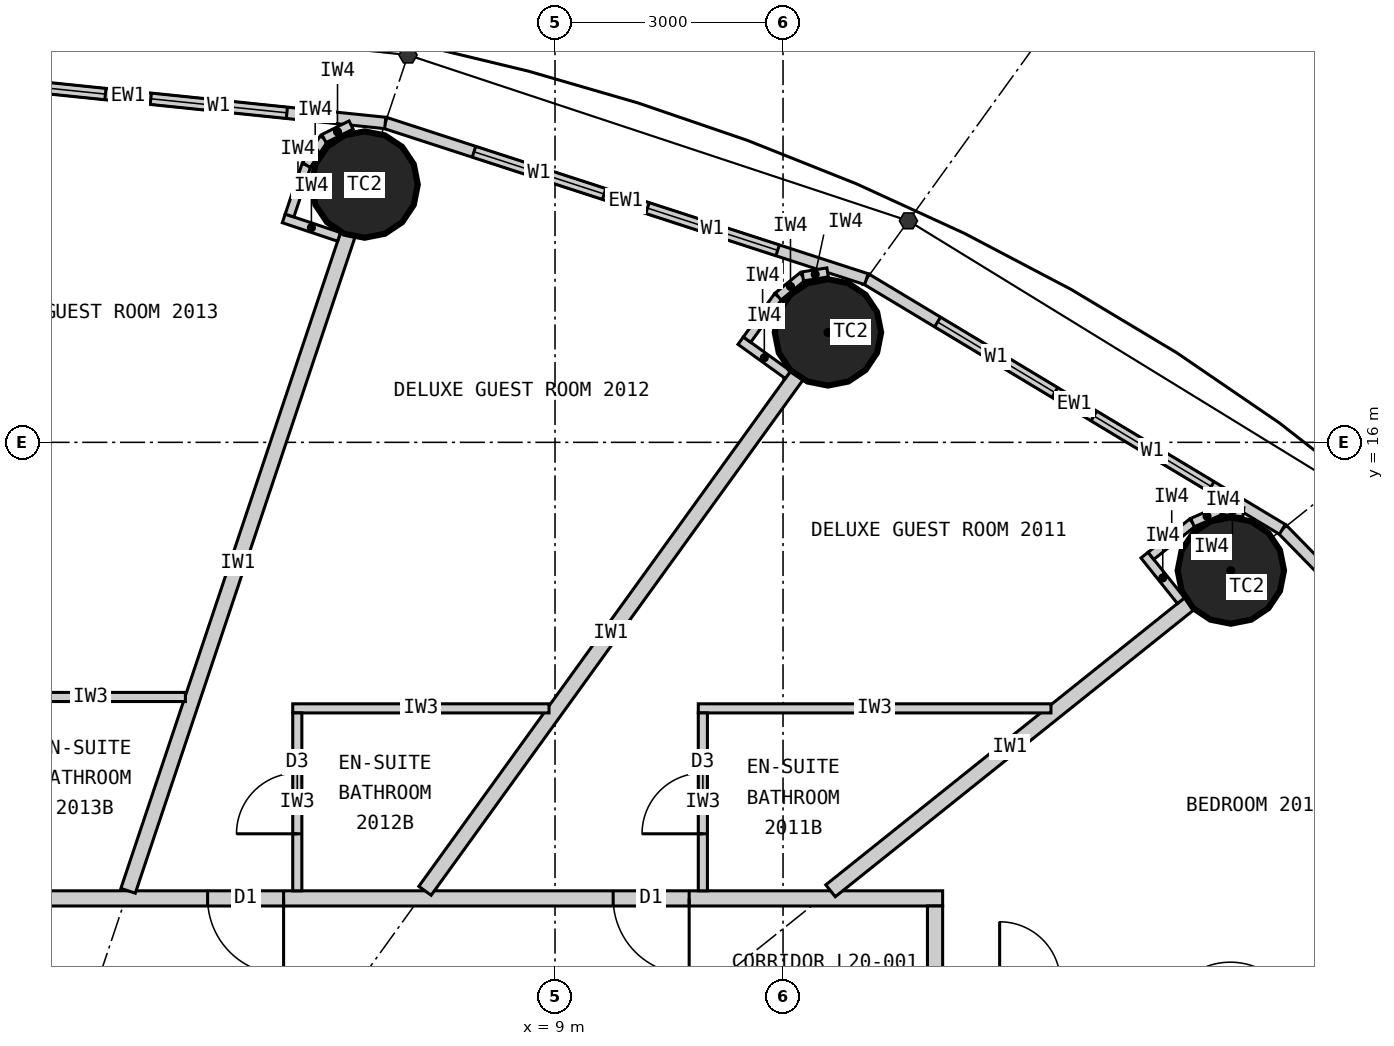
"""IFC4 building model, lengths in metres.
Left out: names, types, materials, properties, quantities, classifications, styles, units other than length and angle.
Written with IfcOpenShell. Run it as: python <this file> out.ifc"""

import sys

from ifc_helpers import new_model, si_unit, direction, frame, frame_2d, origin, origin_2d, place, context, subcontext, project, spatial, rectangle, circle, extrude, element, fill, save


model = new_model("IFC4")
c1 = context("Model", 3, precision=1e-05, world=origin(), true_north=direction((0.0, 1.0)))
c2 = subcontext(c1, "Body", "Model", "MODEL_VIEW")
j1 = project(units=[si_unit("LENGTHUNIT", "METRE"), si_unit("PLANEANGLEUNIT", "RADIAN")], contexts=[c1])
p1 = place(None, origin())
s1 = spatial("IfcSite", under=j1, at=p1, CompositionType="ELEMENT")
p2 = place(p1, origin())
s2 = spatial("IfcBuilding", under=s1, at=p2, CompositionType="ELEMENT")
p3 = place(p2, frame((0.0, 0.0, 80.4)))
s3 = spatial("IfcBuildingStorey", under=s2, at=p3, CompositionType="ELEMENT", Elevation=80.4)
for number, where, z_axis, x_axis in (
    (1, (17.892, 14.313, 0.0), (0.0, 0.0, 1.0), (1.0, 0.0, 0.0)),
    (2, (12.591, 17.447, 0.0), (0.0, 0.0, 1.0), (1.0, 0.0, 0.0)),
    (3, (6.495, 19.391, 0.0), (0.0, 0.0, 1.0), (1.0, 0.0, 0.0)),
):
    element("IfcColumn", number, at=place(p3, frame(where, z_axis=z_axis, x_axis=x_axis)), inside=s3, PredefinedType="COLUMN", context=c2, shape_type="SweptSolid", body=[
        extrude(circle(Radius=0.7, at=origin_2d()), origin(), (0.0, 0.0, 1.0), 3.3),
    ])
p4 = place(p3, frame((22.803, 10.532, 0.0), z_axis=(0.0, 0.0, 1.0), x_axis=(-0.699602905915, 0.714531856557, 0.0)))
e4 = element("IfcWall", 4, at=p4, inside=s3, PredefinedType="ELEMENTEDWALL", context=c2, shape_type="SweptSolid", body=[
    extrude(rectangle(XDim=6.051, YDim=0.15, at=frame_2d((3.025, 0.0))), origin(), (0.0, 0.0, 1.0), 3.12),
])
p5 = place(p4, frame((0.926, 0.0, 0.9)))
e5 = element("IfcOpeningElement", 5, at=p5, cuts=e4, PredefinedType="OPENING", context=c2, shape_type="SweptSolid", body=[
    extrude(rectangle(XDim=1.8, YDim=1.9, at=frame_2d((0.9, 0.95))), frame((0.0, 0.085, 0.0), z_axis=(0.0, -1.0, 0.0), x_axis=(1.0, 0.0, 0.0)), (0.0, 0.0, 1.0), 0.17),
])
p6 = place(p4, frame((3.325, 0.0, 0.9)))
e6 = element("IfcOpeningElement", 6, at=p6, cuts=e4, PredefinedType="OPENING", context=c2, shape_type="SweptSolid", body=[
    extrude(rectangle(XDim=1.8, YDim=1.9, at=frame_2d((0.9, 0.95))), frame((0.0, 0.085, 0.0), z_axis=(0.0, -1.0, 0.0), x_axis=(1.0, 0.0, 0.0)), (0.0, 0.0, 1.0), 0.17),
])
p7 = place(p3, frame((18.57, 14.856, 0.0), z_axis=(0.0, 0.0, 1.0), x_axis=(-0.856983180864, 0.515344377787, 0.0)))
e7 = element("IfcWall", 7, at=p7, inside=s3, PredefinedType="ELEMENTEDWALL", context=c2, shape_type="SweptSolid", body=[
    extrude(rectangle(XDim=6.386, YDim=0.15, at=frame_2d((3.193, 0.0))), origin(), (0.0, 0.0, 1.0), 3.12),
])
p8 = place(p7, frame((1.093, 0.0, 0.9)))
e8 = element("IfcOpeningElement", 8, at=p8, cuts=e7, PredefinedType="OPENING", context=c2, shape_type="SweptSolid", body=[
    extrude(rectangle(XDim=1.8, YDim=1.9, at=frame_2d((0.9, 0.95))), frame((0.0, 0.085, 0.0), z_axis=(0.0, -1.0, 0.0), x_axis=(1.0, 0.0, 0.0)), (0.0, 0.0, 1.0), 0.17),
])
p9 = place(p7, frame((3.493, 0.0, 0.9)))
e9 = element("IfcOpeningElement", 9, at=p9, cuts=e7, PredefinedType="OPENING", context=c2, shape_type="SweptSolid", body=[
    extrude(rectangle(XDim=1.8, YDim=1.9, at=frame_2d((0.9, 0.95))), frame((0.0, 0.085, 0.0), z_axis=(0.0, -1.0, 0.0), x_axis=(1.0, 0.0, 0.0)), (0.0, 0.0, 1.0), 0.17),
])
p10 = place(p3, frame((13.096, 18.147, 0.0), z_axis=(0.0, 0.0, 1.0), x_axis=(-0.951137534625, 0.308767534285, 0.0)))
e10 = element("IfcWall", 10, at=p10, inside=s3, PredefinedType="ELEMENTEDWALL", context=c2, shape_type="SweptSolid", body=[
    extrude(rectangle(XDim=6.655, YDim=0.15, at=frame_2d((3.328, 0.0))), origin(), (0.0, 0.0, 1.0), 3.12),
])
p11 = place(p10, frame((1.228, 0.0, 0.9)))
e11 = element("IfcOpeningElement", 11, at=p11, cuts=e10, PredefinedType="OPENING", context=c2, shape_type="SweptSolid", body=[
    extrude(rectangle(XDim=1.8, YDim=1.9, at=frame_2d((0.9, 0.95))), frame((0.0, 0.085, 0.0), z_axis=(0.0, -1.0, 0.0), x_axis=(1.0, 0.0, 0.0)), (0.0, 0.0, 1.0), 0.17),
])
p12 = place(p10, frame((3.628, 0.0, 0.9)))
e12 = element("IfcOpeningElement", 12, at=p12, cuts=e10, PredefinedType="OPENING", context=c2, shape_type="SweptSolid", body=[
    extrude(rectangle(XDim=1.8, YDim=1.9, at=frame_2d((0.9, 0.95))), frame((0.0, 0.085, 0.0), z_axis=(0.0, -1.0, 0.0), x_axis=(1.0, 0.0, 0.0)), (0.0, 0.0, 1.0), 0.17),
])
p13 = place(p3, frame((6.766, 20.202, 0.0), z_axis=(0.0, 0.0, 1.0), x_axis=(-0.994721394369, 0.102612609291, 0.0)))
e13 = element("IfcWall", 13, at=p13, inside=s3, PredefinedType="ELEMENTEDWALL", context=c2, shape_type="SweptSolid", body=[
    extrude(rectangle(XDim=6.802, YDim=0.15, at=frame_2d((3.401, 0.0))), origin(), (0.0, 0.0, 1.0), 3.12),
])
p14 = place(p13, frame((1.301, 0.0, 0.9)))
e14 = element("IfcOpeningElement", 14, at=p14, cuts=e13, PredefinedType="OPENING", context=c2, shape_type="SweptSolid", body=[
    extrude(rectangle(XDim=1.8, YDim=1.9, at=frame_2d((0.9, 0.95))), frame((0.0, 0.085, 0.0), z_axis=(0.0, -1.0, 0.0), x_axis=(1.0, 0.0, 0.0)), (0.0, 0.0, 1.0), 0.17),
])
p15 = place(p13, frame((3.701, 0.0, 0.9)))
e15 = element("IfcOpeningElement", 15, at=p15, cuts=e13, PredefinedType="OPENING", context=c2, shape_type="SweptSolid", body=[
    extrude(rectangle(XDim=1.8, YDim=1.9, at=frame_2d((0.9, 0.95))), frame((0.0, 0.085, 0.0), z_axis=(0.0, -1.0, 0.0), x_axis=(1.0, 0.0, 0.0)), (0.0, 0.0, 1.0), 0.17),
])
p16 = place(p3, frame((-14.1, 10.0, 0.0), z_axis=(0.0, 0.0, 1.0), x_axis=(1.0, 0.0, 0.0)))
e16 = element("IfcWall", 16, at=p16, inside=s3, PredefinedType="PARTITIONING", context=c2, shape_type="SweptSolid", body=[
    extrude(rectangle(XDim=28.2, YDim=0.2, at=frame_2d((14.1, 0.0))), origin(), (0.0, 0.0, 1.0), 3.12),
])
p17 = place(p16, frame((23.865, 0.0, 0.0)))
e17 = element("IfcOpeningElement", 17, at=p17, cuts=e16, PredefinedType="OPENING", context=c2, shape_type="SweptSolid", body=[
    extrude(rectangle(XDim=1.0, YDim=2.2, at=frame_2d((0.5, 1.1))), frame((0.0, 0.11, 0.0), z_axis=(0.0, -1.0, 0.0), x_axis=(1.0, 0.0, 0.0)), (0.0, 0.0, 1.0), 0.22),
])
p18 = place(p16, frame((18.529, 0.0, 0.0)))
e18 = element("IfcOpeningElement", 18, at=p18, cuts=e16, PredefinedType="OPENING", context=c2, shape_type="SweptSolid", body=[
    extrude(rectangle(XDim=1.0, YDim=2.2, at=frame_2d((0.5, 1.1))), frame((0.0, 0.11, 0.0), z_axis=(0.0, -1.0, 0.0), x_axis=(1.0, 0.0, 0.0)), (0.0, 0.0, 1.0), 0.22),
])
p19 = place(p16, frame((14.623, 0.0, 0.0)))
e19 = element("IfcOpeningElement", 19, at=p19, cuts=e16, PredefinedType="OPENING", context=c2, shape_type="SweptSolid", body=[
    extrude(rectangle(XDim=1.0, YDim=2.2, at=frame_2d((0.5, 1.1))), frame((0.0, 0.11, 0.0), z_axis=(0.0, -1.0, 0.0), x_axis=(1.0, 0.0, 0.0)), (0.0, 0.0, 1.0), 0.22),
])
p20 = place(p16, frame((11.24, 0.0, 0.0)))
e20 = element("IfcOpeningElement", 20, at=p20, cuts=e16, PredefinedType="OPENING", context=c2, shape_type="SweptSolid", body=[
    extrude(rectangle(XDim=1.0, YDim=2.2, at=frame_2d((0.5, 1.1))), frame((0.0, 0.11, 0.0), z_axis=(0.0, -1.0, 0.0), x_axis=(1.0, 0.0, 0.0)), (0.0, 0.0, 1.0), 0.22),
])
p21 = place(p16, frame((8.671, 0.0, 0.0)))
e21 = element("IfcOpeningElement", 21, at=p21, cuts=e16, PredefinedType="OPENING", context=c2, shape_type="SweptSolid", body=[
    extrude(rectangle(XDim=1.0, YDim=2.2, at=frame_2d((0.5, 1.1))), frame((0.0, 0.11, 0.0), z_axis=(0.0, -1.0, 0.0), x_axis=(1.0, 0.0, 0.0)), (0.0, 0.0, 1.0), 0.22),
])
p22 = place(p16, frame((2.801, 0.0, 0.0)))
e22 = element("IfcOpeningElement", 22, at=p22, cuts=e16, PredefinedType="OPENING", context=c2, shape_type="SweptSolid", body=[
    extrude(rectangle(XDim=1.0, YDim=2.2, at=frame_2d((0.5, 1.1))), frame((0.0, 0.11, 0.0), z_axis=(0.0, -1.0, 0.0), x_axis=(1.0, 0.0, 0.0)), (0.0, 0.0, 1.0), 0.22),
])
p23 = place(p3, frame((14.0, -9.9, 0.0), z_axis=(0.0, 0.0, 1.0), x_axis=(0.0, 1.0, 0.0)))
e23 = element("IfcWall", 23, at=p23, inside=s3, PredefinedType="PARTITIONING", context=c2, shape_type="SweptSolid", body=[
    extrude(rectangle(XDim=19.8, YDim=0.2, at=frame_2d((9.9, 0.0))), origin(), (0.0, 0.0, 1.0), 3.12),
])
p24 = place(p23, frame((5.948, 0.0, 0.0)))
e24 = element("IfcOpeningElement", 24, at=p24, cuts=e23, PredefinedType="OPENING", context=c2, shape_type="SweptSolid", body=[
    extrude(rectangle(XDim=1.0, YDim=2.2, at=frame_2d((0.5, 1.1))), frame((0.0, 0.11, 0.0), z_axis=(0.0, -1.0, 0.0), x_axis=(1.0, 0.0, 0.0)), (0.0, 0.0, 1.0), 0.22),
])
p25 = place(p23, frame((11.46, 0.0, 0.0)))
e25 = element("IfcOpeningElement", 25, at=p25, cuts=e23, PredefinedType="OPENING", context=c2, shape_type="SweptSolid", body=[
    extrude(rectangle(XDim=1.0, YDim=2.2, at=frame_2d((0.5, 1.1))), frame((0.0, 0.11, 0.0), z_axis=(0.0, -1.0, 0.0), x_axis=(1.0, 0.0, 0.0)), (0.0, 0.0, 1.0), 0.22),
])
p26 = place(p3, frame((14.1, 6.512, 0.0), z_axis=(0.0, 0.0, 1.0), x_axis=(0.907832871056, 0.419332181247, 0.0)))
e26 = element("IfcWall", 26, at=p26, inside=s3, PredefinedType="PARTITIONING", context=c2, shape_type="SweptSolid", body=[
    extrude(rectangle(XDim=8.023, YDim=0.2, at=frame_2d((4.011, 0.0))), origin(), (0.0, 0.0, 1.0), 2.32),
])
p27 = place(p26, frame((4.17, 0.0, 0.0)))
e27 = element("IfcOpeningElement", 27, at=p27, cuts=e26, PredefinedType="OPENING", context=c2, shape_type="SweptSolid", body=[
    extrude(rectangle(XDim=0.9, YDim=2.1, at=frame_2d((0.45, 1.05))), frame((0.0, 0.11, 0.0), z_axis=(0.0, -1.0, 0.0), x_axis=(1.0, 0.0, 0.0)), (0.0, 0.0, 1.0), 0.22),
])
p28 = place(p3, frame((12.625, 10.1, 0.0), z_axis=(0.0, 0.0, 1.0), x_axis=(0.780892451574, 0.624665493744, 0.0)))
e28 = element("IfcWall", 28, at=p28, inside=s3, PredefinedType="PARTITIONING", context=c2, shape_type="SweptSolid", body=[
    extrude(rectangle(XDim=6.045, YDim=0.2, at=frame_2d((3.022, 0.0))), origin(), (0.0, 0.0, 1.0), 2.32),
])
p29 = place(p3, frame((7.289, 10.1, 0.0), z_axis=(0.0, 0.0, 1.0), x_axis=(0.585198353053, 0.810890182197, 0.0)))
e29 = element("IfcWall", 29, at=p29, inside=s3, PredefinedType="PARTITIONING", context=c2, shape_type="SweptSolid", body=[
    extrude(rectangle(XDim=8.36, YDim=0.2, at=frame_2d((4.18, 0.0))), origin(), (0.0, 0.0, 1.0), 2.32),
])
p30 = place(p3, frame((3.383, 10.1, 0.0), z_axis=(0.0, 0.0, 1.0), x_axis=(0.31759592231, 0.948226149256, 0.0)))
e30 = element("IfcWall", 30, at=p30, inside=s3, PredefinedType="PARTITIONING", context=c2, shape_type="SweptSolid", body=[
    extrude(rectangle(XDim=9.098, YDim=0.2, at=frame_2d((4.549, 0.0))), origin(), (0.0, 0.0, 1.0), 2.32),
])
p31 = place(p3, frame((15.525, 12.5, 0.0), z_axis=(0.0, 0.0, 1.0), x_axis=(-1.0, 0.0, 0.0)))
e31 = element("IfcWall", 31, at=p31, inside=s3, PredefinedType="PARTITIONING", context=c2, shape_type="SweptSolid", body=[
    extrude(rectangle(XDim=4.64, YDim=0.12, at=frame_2d((2.32, 0.0))), origin(), (0.0, 0.0, 1.0), 3.12),
])
p32 = place(p3, frame((10.945, 10.1, 0.0), z_axis=(0.0, 0.0, 1.0), x_axis=(0.0, 1.0, 0.0)))
e32 = element("IfcWall", 32, at=p32, inside=s3, PredefinedType="PARTITIONING", context=c2, shape_type="SweptSolid", body=[
    extrude(rectangle(XDim=2.34, YDim=0.12, at=frame_2d((1.17, 0.0))), origin(), (0.0, 0.0, 1.0), 3.12),
])
p33 = place(p32, frame((0.75, 0.0, 0.0)))
e33 = element("IfcOpeningElement", 33, at=p33, cuts=e32, PredefinedType="OPENING", context=c2, shape_type="SweptSolid", body=[
    extrude(rectangle(XDim=0.8, YDim=2.1, at=frame_2d((0.4, 1.05))), frame((0.0, 0.07, 0.0), z_axis=(0.0, -1.0, 0.0), x_axis=(1.0, 0.0, 0.0)), (0.0, 0.0, 1.0), 0.14),
])
p34 = place(p3, frame((8.921, 12.5, 0.0), z_axis=(0.0, 0.0, 1.0), x_axis=(-1.0, 0.0, 0.0)))
e34 = element("IfcWall", 34, at=p34, inside=s3, PredefinedType="PARTITIONING", context=c2, shape_type="SweptSolid", body=[
    extrude(rectangle(XDim=3.372, YDim=0.12, at=frame_2d((1.686, 0.0))), origin(), (0.0, 0.0, 1.0), 3.12),
])
p35 = place(p3, frame((5.609, 10.1, 0.0), z_axis=(0.0, 0.0, 1.0), x_axis=(0.0, 1.0, 0.0)))
e35 = element("IfcWall", 35, at=p35, inside=s3, PredefinedType="PARTITIONING", context=c2, shape_type="SweptSolid", body=[
    extrude(rectangle(XDim=2.34, YDim=0.12, at=frame_2d((1.17, 0.0))), origin(), (0.0, 0.0, 1.0), 3.12),
])
p36 = place(p35, frame((0.75, 0.0, 0.0)))
e36 = element("IfcOpeningElement", 36, at=p36, cuts=e35, PredefinedType="OPENING", context=c2, shape_type="SweptSolid", body=[
    extrude(rectangle(XDim=0.8, YDim=2.1, at=frame_2d((0.4, 1.05))), frame((0.0, 0.07, 0.0), z_axis=(0.0, -1.0, 0.0), x_axis=(1.0, 0.0, 0.0)), (0.0, 0.0, 1.0), 0.14),
])
p37 = place(p3, frame((4.137, 12.65, 0.0), z_axis=(0.0, 0.0, 1.0), x_axis=(-1.0, 0.0, 0.0)))
e37 = element("IfcWall", 37, at=p37, inside=s3, PredefinedType="PARTITIONING", context=c2, shape_type="SweptSolid", body=[
    extrude(rectangle(XDim=2.494, YDim=0.12, at=frame_2d((1.247, 0.0))), origin(), (0.0, 0.0, 1.0), 3.12),
])
p38 = place(p3, frame((17.236, 13.917, 0.0), z_axis=(0.0, 0.0, 1.0), x_axis=(-0.624695047554, 0.780868809443, 0.0)))
e38 = element("IfcWall", 38, at=p38, inside=s3, PredefinedType="PARTITIONING", context=c2, shape_type="SweptSolid", body=[
    extrude(rectangle(XDim=0.768, YDim=0.12, at=frame_2d((0.384, 0.0))), origin(), (0.0, 0.0, 1.0), 3.12),
])
p39 = place(p3, frame((16.841, 14.507, 0.0), z_axis=(0.0, 0.0, 1.0), x_axis=(0.780902834923, 0.62465251333, 0.0)))
e39 = element("IfcWall", 39, at=p39, inside=s3, PredefinedType="PARTITIONING", context=c2, shape_type="SweptSolid", body=[
    extrude(rectangle(XDim=0.7, YDim=0.12, at=frame_2d((0.35, 0.0))), origin(), (0.0, 0.0, 1.0), 3.12),
])
p40 = place(p3, frame((17.387, 14.944, 0.0), z_axis=(0.0, 0.0, 1.0), x_axis=(0.916036698064, 0.401094462441, 0.0)))
e40 = element("IfcWall", 40, at=p40, inside=s3, PredefinedType="PARTITIONING", context=c2, shape_type="SweptSolid", body=[
    extrude(rectangle(XDim=0.418, YDim=0.12, at=frame_2d((0.209, 0.0))), origin(), (0.0, 0.0, 1.0), 3.12),
])
p41 = place(p3, frame((17.77, 15.112, 0.0), z_axis=(0.0, 0.0, 1.0), x_axis=(0.993904401174, -0.110245368731, 0.0)))
e41 = element("IfcWall", 41, at=p41, inside=s3, PredefinedType="PARTITIONING", context=c2, shape_type="SweptSolid", body=[
    extrude(rectangle(XDim=0.288, YDim=0.12, at=frame_2d((0.144, 0.0))), origin(), (0.0, 0.0, 1.0), 3.12),
])
p42 = place(p3, frame((12.065, 16.889, 0.0), z_axis=(0.0, 0.0, 1.0), x_axis=(-0.810821798253, 0.585293098778, 0.0)))
e42 = element("IfcWall", 42, at=p42, inside=s3, PredefinedType="PARTITIONING", context=c2, shape_type="SweptSolid", body=[
    extrude(rectangle(XDim=0.768, YDim=0.12, at=frame_2d((0.384, 0.0))), origin(), (0.0, 0.0, 1.0), 3.12),
])
p43 = place(p3, frame((11.526, 17.351, 0.0), z_axis=(0.0, 0.0, 1.0), x_axis=(0.585223113993, 0.810872312296, 0.0)))
e43 = element("IfcWall", 43, at=p43, inside=s3, PredefinedType="PARTITIONING", context=c2, shape_type="SweptSolid", body=[
    extrude(rectangle(XDim=0.7, YDim=0.12, at=frame_2d((0.35, 0.0))), origin(), (0.0, 0.0, 1.0), 3.12),
])
p44 = place(p3, frame((11.936, 17.919, 0.0), z_axis=(0.0, 0.0, 1.0), x_axis=(0.775023088441, 0.631932917629, 0.0)))
e44 = element("IfcWall", 44, at=p44, inside=s3, PredefinedType="PARTITIONING", context=c2, shape_type="SweptSolid", body=[
    extrude(rectangle(XDim=0.418, YDim=0.12, at=frame_2d((0.209, 0.0))), origin(), (0.0, 0.0, 1.0), 3.12),
])
p45 = place(p3, frame((12.26, 18.183, 0.0), z_axis=(0.0, 0.0, 1.0), x_axis=(0.987218661664, 0.159371622511, 0.0)))
e45 = element("IfcWall", 45, at=p45, inside=s3, PredefinedType="PARTITIONING", context=c2, shape_type="SweptSolid", body=[
    extrude(rectangle(XDim=0.331, YDim=0.12, at=frame_2d((0.166, 0.0))), origin(), (0.0, 0.0, 1.0), 3.12),
])
p46 = place(p3, frame((6.159, 18.702, 0.0), z_axis=(0.0, 0.0, 1.0), x_axis=(-0.948173154049, 0.31775410295, 0.0)))
e46 = element("IfcWall", 46, at=p46, inside=s3, PredefinedType="PARTITIONING", context=c2, shape_type="SweptSolid", body=[
    extrude(rectangle(XDim=0.768, YDim=0.12, at=frame_2d((0.384, 0.0))), origin(), (0.0, 0.0, 1.0), 3.12),
])
p47 = place(p3, frame((5.507, 18.984, 0.0), z_axis=(0.0, 0.0, 1.0), x_axis=(0.317692050622, 0.948193946918, 0.0)))
e47 = element("IfcWall", 47, at=p47, inside=s3, PredefinedType="PARTITIONING", context=c2, shape_type="SweptSolid", body=[
    extrude(rectangle(XDim=0.7, YDim=0.12, at=frame_2d((0.35, 0.0))), origin(), (0.0, 0.0, 1.0), 3.12),
])
p48 = place(p3, frame((5.729, 19.648, 0.0), z_axis=(0.0, 0.0, 1.0), x_axis=(0.552135764955, 0.833754218615, 0.0)))
e48 = element("IfcWall", 48, at=p48, inside=s3, PredefinedType="PARTITIONING", context=c2, shape_type="SweptSolid", body=[
    extrude(rectangle(XDim=0.418, YDim=0.12, at=frame_2d((0.209, 0.0))), origin(), (0.0, 0.0, 1.0), 3.12),
])
p49 = place(p3, frame((5.96, 19.996, 0.0), z_axis=(0.0, 0.0, 1.0), x_axis=(0.895160725913, 0.445743507842, 0.0)))
e49 = element("IfcWall", 49, at=p49, inside=s3, PredefinedType="PARTITIONING", context=c2, shape_type="SweptSolid", body=[
    extrude(rectangle(XDim=0.399, YDim=0.12, at=frame_2d((0.199, 0.0))), origin(), (0.0, 0.0, 1.0), 3.12),
])
p50 = place(p8, origin())
e50 = element("IfcWindow", 50, at=p50, inside=s3, PartitioningType="SINGLE_PANEL", PredefinedType="WINDOW", context=c2, shape_type="SweptSolid", body=[
    extrude(rectangle(XDim=1.8, YDim=1.9, at=frame_2d((0.9, 0.95))), frame((0.0, 0.03, 0.0), z_axis=(0.0, -1.0, 0.0), x_axis=(1.0, 0.0, 0.0)), (0.0, 0.0, 1.0), 0.06),
])
fill(e8, e50)
p51 = place(p9, origin())
e51 = element("IfcWindow", 51, at=p51, inside=s3, PartitioningType="SINGLE_PANEL", PredefinedType="WINDOW", context=c2, shape_type="SweptSolid", body=[
    extrude(rectangle(XDim=1.8, YDim=1.9, at=frame_2d((0.9, 0.95))), frame((0.0, 0.03, 0.0), z_axis=(0.0, -1.0, 0.0), x_axis=(1.0, 0.0, 0.0)), (0.0, 0.0, 1.0), 0.06),
])
fill(e9, e51)
p52 = place(p11, origin())
e52 = element("IfcWindow", 52, at=p52, inside=s3, PartitioningType="SINGLE_PANEL", PredefinedType="WINDOW", context=c2, shape_type="SweptSolid", body=[
    extrude(rectangle(XDim=1.8, YDim=1.9, at=frame_2d((0.9, 0.95))), frame((0.0, 0.03, 0.0), z_axis=(0.0, -1.0, 0.0), x_axis=(1.0, 0.0, 0.0)), (0.0, 0.0, 1.0), 0.06),
])
fill(e11, e52)
p53 = place(p12, origin())
e53 = element("IfcWindow", 53, at=p53, inside=s3, PartitioningType="SINGLE_PANEL", PredefinedType="WINDOW", context=c2, shape_type="SweptSolid", body=[
    extrude(rectangle(XDim=1.8, YDim=1.9, at=frame_2d((0.9, 0.95))), frame((0.0, 0.03, 0.0), z_axis=(0.0, -1.0, 0.0), x_axis=(1.0, 0.0, 0.0)), (0.0, 0.0, 1.0), 0.06),
])
fill(e12, e53)
p54 = place(p14, origin())
e54 = element("IfcWindow", 54, at=p54, inside=s3, PartitioningType="SINGLE_PANEL", PredefinedType="WINDOW", context=c2, shape_type="SweptSolid", body=[
    extrude(rectangle(XDim=1.8, YDim=1.9, at=frame_2d((0.9, 0.95))), frame((0.0, 0.03, 0.0), z_axis=(0.0, -1.0, 0.0), x_axis=(1.0, 0.0, 0.0)), (0.0, 0.0, 1.0), 0.06),
])
fill(e14, e54)
p55 = place(p15, origin())
e55 = element("IfcWindow", 55, at=p55, inside=s3, PartitioningType="SINGLE_PANEL", PredefinedType="WINDOW", context=c2, shape_type="SweptSolid", body=[
    extrude(rectangle(XDim=1.8, YDim=1.9, at=frame_2d((0.9, 0.95))), frame((0.0, 0.03, 0.0), z_axis=(0.0, -1.0, 0.0), x_axis=(1.0, 0.0, 0.0)), (0.0, 0.0, 1.0), 0.06),
])
fill(e15, e55)
p56 = place(p33, origin())
e56 = element("IfcDoor", 56, at=p56, inside=s3, OperationType="SINGLE_SWING_LEFT", PredefinedType="DOOR", context=c2, shape_type="SweptSolid", body=[
    extrude(rectangle(XDim=0.8, YDim=2.1, at=frame_2d((0.4, 1.05))), frame((0.0, 0.025, 0.0), z_axis=(0.0, -1.0, 0.0), x_axis=(1.0, 0.0, 0.0)), (0.0, 0.0, 1.0), 0.05),
])
fill(e33, e56)
p57 = place(p17, origin())
e57 = element("IfcDoor", 57, at=p57, inside=s3, OperationType="SINGLE_SWING_RIGHT", PredefinedType="DOOR", context=c2, shape_type="SweptSolid", body=[
    extrude(rectangle(XDim=1.0, YDim=2.2, at=frame_2d((0.5, 1.1))), frame((0.0, 0.025, 0.0), z_axis=(0.0, -1.0, 0.0), x_axis=(1.0, 0.0, 0.0)), (0.0, 0.0, 1.0), 0.05),
])
fill(e17, e57)
p58 = place(p36, origin())
e58 = element("IfcDoor", 58, at=p58, inside=s3, OperationType="SINGLE_SWING_LEFT", PredefinedType="DOOR", context=c2, shape_type="SweptSolid", body=[
    extrude(rectangle(XDim=0.8, YDim=2.1, at=frame_2d((0.4, 1.05))), frame((0.0, 0.025, 0.0), z_axis=(0.0, -1.0, 0.0), x_axis=(1.0, 0.0, 0.0)), (0.0, 0.0, 1.0), 0.05),
])
fill(e36, e58)
p59 = place(p18, origin())
e59 = element("IfcDoor", 59, at=p59, inside=s3, OperationType="SINGLE_SWING_RIGHT", PredefinedType="DOOR", context=c2, shape_type="SweptSolid", body=[
    extrude(rectangle(XDim=1.0, YDim=2.2, at=frame_2d((0.5, 1.1))), frame((0.0, 0.025, 0.0), z_axis=(0.0, -1.0, 0.0), x_axis=(1.0, 0.0, 0.0)), (0.0, 0.0, 1.0), 0.05),
])
fill(e18, e59)
save(model, sys.argv[1])
